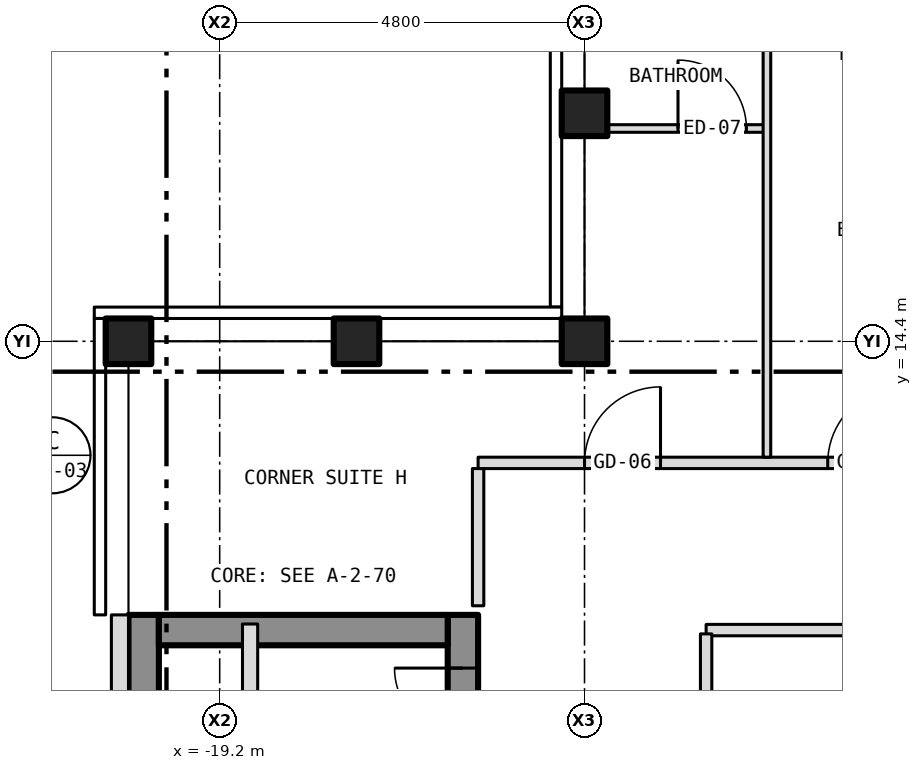
"""IFC4 building model, lengths in metres.
Left out: names, types, materials, properties, quantities, classifications, styles, units other than length and angle.
Written with IfcOpenShell. Run it as: python <this file> out.ifc"""

import sys

from ifc_helpers import new_model, si_unit, direction, frame, frame_2d, origin, origin_2d, place, context, subcontext, project, spatial, rectangle, hollow_rectangle, extrude, element, fill, save


model = new_model("IFC4")
c1 = context("Model", 3, precision=1e-05, world=origin(), true_north=direction((0.0, 1.0)))
c2 = subcontext(c1, "Body", "Model", "MODEL_VIEW")
j1 = project(units=[si_unit("LENGTHUNIT", "METRE"), si_unit("PLANEANGLEUNIT", "RADIAN")], contexts=[c1])
p1 = place(None, origin())
s1 = spatial("IfcSite", under=j1, at=p1, CompositionType="ELEMENT")
p2 = place(p1, origin())
s2 = spatial("IfcBuilding", under=s1, at=p2, CompositionType="ELEMENT")
p3 = place(p2, frame((0.0, 0.0, 255.0)))
s3 = spatial("IfcBuildingStorey", under=s2, at=p3, CompositionType="ELEMENT", Elevation=255.0)
for number, where, z_axis, x_axis in (
    (1, (-20.4, 14.4, -0.15), (0.0, 0.0, 1.0), (1.0, 0.0, 0.0)),
    (2, (-14.4, 14.4, -0.15), (0.0, 0.0, 1.0), (1.0, 0.0, 0.0)),
    (3, (-14.4, 17.4, -0.15), (0.0, 0.0, 1.0), (1.0, 0.0, 0.0)),
    (4, (-17.4, 14.4, -0.15), (0.0, 0.0, 1.0), (1.0, 0.0, 0.0)),
):
    element("IfcColumn", number, at=place(p3, frame(where, z_axis=z_axis, x_axis=x_axis)), inside=s3, PredefinedType="COLUMN", context=c2, shape_type="SweptSolid", body=[
        extrude(hollow_rectangle(XDim=0.6, YDim=0.6, WallThickness=0.03, at=origin_2d()), origin(), (0.0, 0.0, 1.0), 3.5),
    ])
p4 = place(p3, frame((-16.0, -10.8, 0.0), z_axis=(0.0, 0.0, 1.0), x_axis=(0.0, 1.0, 0.0)))
e5 = element("IfcWall", 5, at=p4, inside=s3, PredefinedType="SHEAR", context=c2, shape_type="SweptSolid", body=[
    extrude(rectangle(XDim=21.6, YDim=0.4, at=frame_2d((10.8, 0.0))), origin(), (0.0, 0.0, 1.0), 3.25),
])
p5 = place(p4, frame((9.4, 0.0, 0.0)))
e6 = element("IfcOpeningElement", 6, at=p5, cuts=e5, PredefinedType="OPENING", context=c2, shape_type="SweptSolid", body=[
    extrude(rectangle(XDim=1.1, YDim=2.1, at=frame_2d((0.55, 1.05))), frame((0.0, 0.212, 0.0), z_axis=(0.0, -1.0, 0.0), x_axis=(1.0, 0.0, 0.0)), (0.0, 0.0, 1.0), 0.424),
])
p6 = place(p4, frame((11.5, 0.0, 0.0)))
e7 = element("IfcOpeningElement", 7, at=p6, cuts=e5, PredefinedType="OPENING", context=c2, shape_type="SweptSolid", body=[
    extrude(rectangle(XDim=1.1, YDim=2.1, at=frame_2d((0.55, 1.05))), frame((0.0, 0.212, 0.0), z_axis=(0.0, -1.0, 0.0), x_axis=(1.0, 0.0, 0.0)), (0.0, 0.0, 1.0), 0.424),
])
p7 = place(p4, frame((13.6, 0.0, 0.0)))
e8 = element("IfcOpeningElement", 8, at=p7, cuts=e5, PredefinedType="OPENING", context=c2, shape_type="SweptSolid", body=[
    extrude(rectangle(XDim=1.1, YDim=2.1, at=frame_2d((0.55, 1.05))), frame((0.0, 0.212, 0.0), z_axis=(0.0, -1.0, 0.0), x_axis=(1.0, 0.0, 0.0)), (0.0, 0.0, 1.0), 0.424),
])
p8 = place(p4, frame((15.7, 0.0, 0.0)))
e9 = element("IfcOpeningElement", 9, at=p8, cuts=e5, PredefinedType="OPENING", context=c2, shape_type="SweptSolid", body=[
    extrude(rectangle(XDim=1.1, YDim=2.1, at=frame_2d((0.55, 1.05))), frame((0.0, 0.212, 0.0), z_axis=(0.0, -1.0, 0.0), x_axis=(1.0, 0.0, 0.0)), (0.0, 0.0, 1.0), 0.424),
])
p9 = place(p4, frame((17.8, 0.0, 0.0)))
e10 = element("IfcOpeningElement", 10, at=p9, cuts=e5, PredefinedType="OPENING", context=c2, shape_type="SweptSolid", body=[
    extrude(rectangle(XDim=1.1, YDim=2.1, at=frame_2d((0.55, 1.05))), frame((0.0, 0.212, 0.0), z_axis=(0.0, -1.0, 0.0), x_axis=(1.0, 0.0, 0.0)), (0.0, 0.0, 1.0), 0.424),
])
p10 = place(p4, frame((0.458, 0.0, 0.0)))
e11 = element("IfcOpeningElement", 11, at=p10, cuts=e5, PredefinedType="OPENING", context=c2, shape_type="SweptSolid", body=[
    extrude(rectangle(XDim=1.1, YDim=2.1, at=frame_2d((0.55, 1.05))), frame((0.0, 0.212, 0.0), z_axis=(0.0, -1.0, 0.0), x_axis=(1.0, 0.0, 0.0)), (0.0, 0.0, 1.0), 0.424),
])
p11 = place(p4, frame((7.5, 0.0, 0.0)))
e12 = element("IfcOpeningElement", 12, at=p11, cuts=e5, PredefinedType="OPENING", context=c2, shape_type="SweptSolid", body=[
    extrude(rectangle(XDim=1.1, YDim=2.1, at=frame_2d((0.55, 1.05))), frame((0.0, 0.212, 0.0), z_axis=(0.0, -1.0, 0.0), x_axis=(1.0, 0.0, 0.0)), (0.0, 0.0, 1.0), 0.424),
])
p12 = place(p4, frame((20.0, 0.0, 0.0)))
e13 = element("IfcOpeningElement", 13, at=p12, cuts=e5, PredefinedType="OPENING", context=c2, shape_type="SweptSolid", body=[
    extrude(rectangle(XDim=0.9, YDim=2.1, at=frame_2d((0.45, 1.05))), frame((0.0, 0.212, 0.0), z_axis=(0.0, -1.0, 0.0), x_axis=(1.0, 0.0, 0.0)), (0.0, 0.0, 1.0), 0.424),
])
p13 = place(p3, frame((-20.2, -10.8, 0.0), z_axis=(0.0, 0.0, 1.0), x_axis=(0.0, 1.0, 0.0)))
e14 = element("IfcWall", 14, at=p13, inside=s3, PredefinedType="SHEAR", context=c2, shape_type="SweptSolid", body=[
    extrude(rectangle(XDim=21.6, YDim=0.4, at=frame_2d((10.8, 0.0))), origin(), (0.0, 0.0, 1.0), 3.25),
])
p14 = place(p3, frame((-20.0, 10.6, 0.0), z_axis=(0.0, 0.0, 1.0), x_axis=(1.0, 0.0, 0.0)))
e15 = element("IfcWall", 15, at=p14, inside=s3, PredefinedType="SHEAR", context=c2, shape_type="SweptSolid", body=[
    extrude(rectangle(XDim=3.8, YDim=0.4, at=frame_2d((1.9, 0.0))), origin(), (0.0, 0.0, 1.0), 3.25),
])
p15 = place(p3, frame((-20.512, 10.8, 0.0), z_axis=(0.0, 0.0, 1.0), x_axis=(0.0, -1.0, 0.0)))
e16 = element("IfcWall", 16, at=p15, inside=s3, PredefinedType="SOLIDWALL", context=c2, shape_type="SweptSolid", body=[
    extrude(rectangle(XDim=21.6, YDim=0.225, at=frame_2d((10.8, 0.0))), origin(), (0.0, 0.0, 1.0), 3.5),
])
p16 = place(p15, frame((18.05, 0.0, 1.0)))
e17 = element("IfcOpeningElement", 17, at=p16, cuts=e16, PredefinedType="OPENING", context=c2, shape_type="SweptSolid", body=[
    extrude(rectangle(XDim=0.6, YDim=1.5, at=frame_2d((0.3, 0.75))), frame((0.0, 0.125, 0.0), z_axis=(0.0, -1.0, 0.0), x_axis=(1.0, 0.0, 0.0)), (0.0, 0.0, 1.0), 0.249),
])
p17 = place(p3, frame((-12.8, 10.6, 0.0), z_axis=(0.0, 0.0, 1.0), x_axis=(1.0, 0.0, 0.0)))
e18 = element("IfcWall", 18, at=p17, inside=s3, PredefinedType="PARTITIONING", context=c2, shape_type="SweptSolid", body=[
    extrude(rectangle(XDim=15.4, YDim=0.15, at=frame_2d((7.7, 0.0))), origin(), (0.0, 0.0, 1.0), 3.35),
])
p18 = place(p17, frame((8.85, 0.0, 0.0)))
e19 = element("IfcOpeningElement", 19, at=p18, cuts=e18, PredefinedType="OPENING", context=c2, shape_type="SweptSolid", body=[
    extrude(rectangle(XDim=0.9, YDim=2.1, at=frame_2d((0.45, 1.05))), frame((0.0, 0.087, 0.0), z_axis=(0.0, -1.0, 0.0), x_axis=(1.0, 0.0, 0.0)), (0.0, 0.0, 1.0), 0.174),
])
p19 = place(p3, frame((-15.8, 12.8, 0.0), z_axis=(0.0, 0.0, 1.0), x_axis=(1.0, 0.0, 0.0)))
e20 = element("IfcWall", 20, at=p19, inside=s3, PredefinedType="PARTITIONING", context=c2, shape_type="SweptSolid", body=[
    extrude(rectangle(XDim=31.6, YDim=0.15, at=frame_2d((15.8, 0.0))), origin(), (0.0, 0.0, 1.0), 3.35),
])
p20 = place(p19, frame((4.6, 0.0, 0.0)))
e21 = element("IfcOpeningElement", 21, at=p20, cuts=e20, PredefinedType="OPENING", context=c2, shape_type="SweptSolid", body=[
    extrude(rectangle(XDim=1.0, YDim=2.1, at=frame_2d((0.5, 1.05))), frame((0.0, 0.087, 0.0), z_axis=(0.0, -1.0, 0.0), x_axis=(1.0, 0.0, 0.0)), (0.0, 0.0, 1.0), 0.174),
])
p21 = place(p19, frame((10.26, 0.0, 0.0)))
e22 = element("IfcOpeningElement", 22, at=p21, cuts=e20, PredefinedType="OPENING", context=c2, shape_type="SweptSolid", body=[
    extrude(rectangle(XDim=1.0, YDim=2.1, at=frame_2d((0.5, 1.05))), frame((0.0, 0.087, 0.0), z_axis=(0.0, -1.0, 0.0), x_axis=(1.0, 0.0, 0.0)), (0.0, 0.0, 1.0), 0.174),
])
p22 = place(p19, frame((19.86, 0.0, 0.0)))
e23 = element("IfcOpeningElement", 23, at=p22, cuts=e20, PredefinedType="OPENING", context=c2, shape_type="SweptSolid", body=[
    extrude(rectangle(XDim=1.0, YDim=2.1, at=frame_2d((0.5, 1.05))), frame((0.0, 0.087, 0.0), z_axis=(0.0, -1.0, 0.0), x_axis=(1.0, 0.0, 0.0)), (0.0, 0.0, 1.0), 0.174),
])
p23 = place(p19, frame((1.4, 0.0, 0.0)))
e24 = element("IfcOpeningElement", 24, at=p23, cuts=e20, PredefinedType="OPENING", context=c2, shape_type="SweptSolid", body=[
    extrude(rectangle(XDim=1.0, YDim=2.1, at=frame_2d((0.5, 1.05))), frame((0.0, 0.087, 0.0), z_axis=(0.0, -1.0, 0.0), x_axis=(1.0, 0.0, 0.0)), (0.0, 0.0, 1.0), 0.174),
])
p24 = place(p19, frame((29.2, 0.0, 0.0)))
e25 = element("IfcOpeningElement", 25, at=p24, cuts=e20, PredefinedType="OPENING", context=c2, shape_type="SweptSolid", body=[
    extrude(rectangle(XDim=1.0, YDim=2.1, at=frame_2d((0.5, 1.05))), frame((0.0, 0.087, 0.0), z_axis=(0.0, -1.0, 0.0), x_axis=(1.0, 0.0, 0.0)), (0.0, 0.0, 1.0), 0.174),
])
p25 = place(p3, frame((-14.28, 17.2, 0.0), z_axis=(0.0, 0.0, 1.0), x_axis=(1.0, 0.0, 0.0)))
e26 = element("IfcWall", 26, at=p25, inside=s3, PredefinedType="PARTITIONING", context=c2, shape_type="SweptSolid", body=[
    extrude(rectangle(XDim=2.28, YDim=0.1, at=frame_2d((1.14, 0.0))), origin(), (0.0, 0.0, 1.0), 3.35),
])
p26 = place(p25, frame((1.11, 0.0, 0.0)))
e27 = element("IfcOpeningElement", 27, at=p26, cuts=e26, PredefinedType="OPENING", context=c2, shape_type="SweptSolid", body=[
    extrude(rectangle(XDim=0.9, YDim=2.1, at=frame_2d((0.45, 1.05))), frame((0.0, 0.062, 0.0), z_axis=(0.0, -1.0, 0.0), x_axis=(1.0, 0.0, 0.0)), (0.0, 0.0, 1.0), 0.124),
])
p27 = place(p3, frame((-18.8, 6.6, 0.0), z_axis=(0.0, 0.0, 1.0), x_axis=(0.0, 1.0, 0.0)))
e28 = element("IfcWall", 28, at=p27, inside=s3, PredefinedType="PARTITIONING", context=c2, shape_type="SweptSolid", body=[
    extrude(rectangle(XDim=4.08, YDim=0.2, at=frame_2d((2.04, 0.0))), origin(), (0.0, 0.0, 1.0), 3.25),
])
p28 = place(p3, frame((-15.8, 10.92, 0.0), z_axis=(0.0, 0.0, 1.0), x_axis=(0.0, 1.0, 0.0)))
e29 = element("IfcWall", 29, at=p28, inside=s3, PredefinedType="PARTITIONING", context=c2, shape_type="SweptSolid", body=[
    extrude(rectangle(XDim=1.805, YDim=0.15, at=frame_2d((0.903, 0.0))), origin(), (0.0, 0.0, 1.0), 3.35),
])
p29 = place(p3, frame((-12.8, 8.175, 0.0), z_axis=(0.0, 0.0, 1.0), x_axis=(0.0, 1.0, 0.0)))
e30 = element("IfcWall", 30, at=p29, inside=s3, PredefinedType="PARTITIONING", context=c2, shape_type="SweptSolid", body=[
    extrude(rectangle(XDim=2.375, YDim=0.15, at=frame_2d((1.188, 0.0))), origin(), (0.0, 0.0, 1.0), 3.35),
])
p30 = place(p3, frame((-12.0, 12.875, 0.0), z_axis=(0.0, 0.0, 1.0), x_axis=(0.0, 1.0, 0.0)))
e31 = element("IfcWall", 31, at=p30, inside=s3, PredefinedType="PARTITIONING", context=c2, shape_type="SweptSolid", body=[
    extrude(rectangle(XDim=7.855, YDim=0.1, at=frame_2d((3.927, 0.0))), origin(), (0.0, 0.0, 1.0), 3.35),
])
p31 = place(p12, origin())
e32 = element("IfcDoor", 32, at=p31, inside=s3, OperationType="SINGLE_SWING_RIGHT", PredefinedType="DOOR", context=c2, shape_type="SweptSolid", body=[
    extrude(rectangle(XDim=0.9, YDim=2.1, at=frame_2d((0.45, 1.05))), frame((0.0, 0.025, 0.0), z_axis=(0.0, -1.0, 0.0), x_axis=(1.0, 0.0, 0.0)), (0.0, 0.0, 1.0), 0.05),
])
fill(e13, e32)
p32 = place(p20, origin())
e33 = element("IfcDoor", 33, at=p32, inside=s3, OperationType="SINGLE_SWING_RIGHT", PredefinedType="DOOR", context=c2, shape_type="SweptSolid", body=[
    extrude(rectangle(XDim=1.0, YDim=2.1, at=frame_2d((0.5, 1.05))), frame((0.0, 0.025, 0.0), z_axis=(0.0, -1.0, 0.0), x_axis=(1.0, 0.0, 0.0)), (0.0, 0.0, 1.0), 0.05),
])
fill(e21, e33)
p33 = place(p26, origin())
e34 = element("IfcDoor", 34, at=p33, inside=s3, OperationType="SINGLE_SWING_LEFT", PredefinedType="DOOR", context=c2, shape_type="SweptSolid", body=[
    extrude(rectangle(XDim=0.9, YDim=2.1, at=frame_2d((0.45, 1.05))), frame((0.0, 0.025, 0.0), z_axis=(0.0, -1.0, 0.0), x_axis=(1.0, 0.0, 0.0)), (0.0, 0.0, 1.0), 0.05),
])
fill(e27, e34)
p34 = place(p23, origin())
e35 = element("IfcDoor", 35, at=p34, inside=s3, OperationType="SINGLE_SWING_RIGHT", PredefinedType="DOOR", context=c2, shape_type="SweptSolid", body=[
    extrude(rectangle(XDim=1.0, YDim=2.1, at=frame_2d((0.5, 1.05))), frame((0.0, 0.025, 0.0), z_axis=(0.0, -1.0, 0.0), x_axis=(1.0, 0.0, 0.0)), (0.0, 0.0, 1.0), 0.05),
])
fill(e24, e35)
save(model, sys.argv[1])
